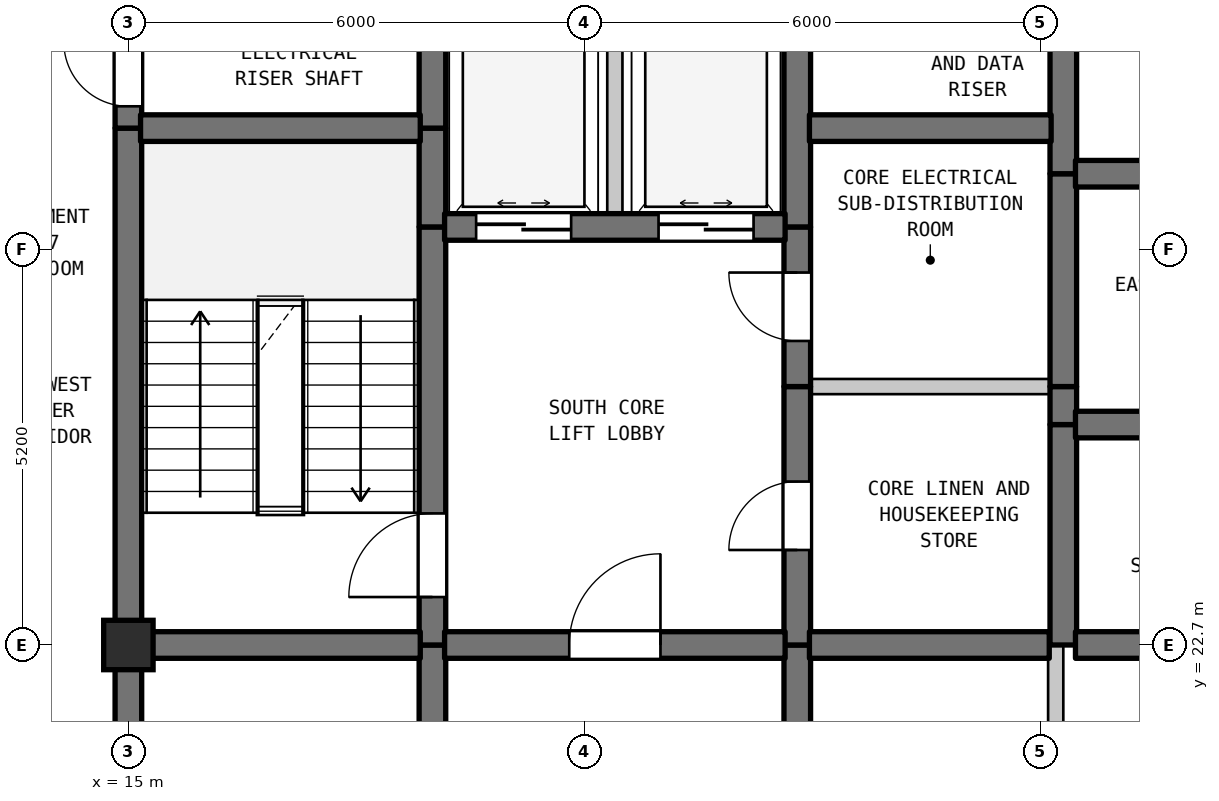
"""IFC4 building model, lengths in metres.
Left out: names, types, materials, properties, quantities, classifications, styles, units other than length and angle.
Written with IfcOpenShell. Run it as: python <this file> out.ifc"""

import sys

from ifc_helpers import new_model, si_unit, direction, frame, frame_2d, origin, origin_2d, place, context, subcontext, project, spatial, rectangle, extrude, element, fill, save


model = new_model("IFC4")
c1 = context("Model", 3, precision=1e-05, world=origin(), true_north=direction((0.0, 1.0)))
c2 = subcontext(c1, "Body", "Model", "MODEL_VIEW")
j1 = project(units=[si_unit("LENGTHUNIT", "METRE"), si_unit("PLANEANGLEUNIT", "RADIAN")], contexts=[c1])
p1 = place(None, origin())
s1 = spatial("IfcSite", under=j1, at=p1, CompositionType="ELEMENT")
p2 = place(p1, origin())
s2 = spatial("IfcBuilding", under=s1, at=p2, CompositionType="ELEMENT")
p3 = place(p2, frame((0.0, 0.0, 288.0)))
s3 = spatial("IfcBuildingStorey", under=s2, at=p3, CompositionType="ELEMENT", Elevation=288.0)
p4 = place(p3, frame((15.0, 22.7, 0.0), z_axis=(0.0, 0.0, 1.0), x_axis=(1.0, 0.0, 0.0)))
e1 = element("IfcColumn", 1, at=p4, inside=s3, PredefinedType="COLUMN", context=c2, shape_type="SweptSolid", body=[
    extrude(rectangle(XDim=0.65, YDim=0.65, at=origin_2d()), origin(), (0.0, 0.0, 1.0), 3.7),
])
p5 = place(p3, frame((15.0, 19.5, 0.0), z_axis=(0.0, 0.0, 1.0), x_axis=(0.0, 1.0, 0.0)))
e2 = element("IfcWall", 2, at=p5, inside=s3, PredefinedType="SHEAR", context=c2, shape_type="SweptSolid", body=[
    extrude(rectangle(XDim=3.2, YDim=0.35, at=frame_2d((1.6, 0.0))), origin(), (0.0, 0.0, 1.0), 3.39),
])
p6 = place(p3, frame((15.0, 22.7, 0.0), z_axis=(0.0, 0.0, 1.0), x_axis=(0.0, 1.0, 0.0)))
e3 = element("IfcWall", 3, at=p6, inside=s3, PredefinedType="SHEAR", context=c2, shape_type="SweptSolid", body=[
    extrude(rectangle(XDim=6.8, YDim=0.35, at=frame_2d((3.4, 0.0))), origin(), (0.0, 0.0, 1.0), 3.39),
])
p7 = place(p3, frame((15.0, 29.5, 0.0), z_axis=(0.0, 0.0, 1.0), x_axis=(0.0, 1.0, 0.0)))
e4 = element("IfcWall", 4, at=p7, inside=s3, PredefinedType="SHEAR", context=c2, shape_type="SweptSolid", body=[
    extrude(rectangle(XDim=1.6, YDim=0.35, at=frame_2d((0.8, 0.0))), origin(), (0.0, 0.0, 1.0), 3.39),
])
p8 = place(p7, frame((0.287, 0.0, 0.0)))
e5 = element("IfcOpeningElement", 5, at=p8, cuts=e4, PredefinedType="OPENING", context=c2, shape_type="SweptSolid", body=[
    extrude(rectangle(XDim=0.85, YDim=2.1, at=frame_2d((0.425, 1.05))), frame((0.0, 0.185, 0.0), z_axis=(0.0, -1.0, 0.0), x_axis=(1.0, 0.0, 0.0)), (0.0, 0.0, 1.0), 0.37),
])
p9 = place(p3, frame((19.0, 19.5, 0.0), z_axis=(0.0, 0.0, 1.0), x_axis=(0.0, 1.0, 0.0)))
e6 = element("IfcWall", 6, at=p9, inside=s3, PredefinedType="SHEAR", context=c2, shape_type="SweptSolid", body=[
    extrude(rectangle(XDim=3.2, YDim=0.35, at=frame_2d((1.6, 0.0))), origin(), (0.0, 0.0, 1.0), 3.39),
])
p10 = place(p3, frame((19.0, 22.7, 0.0), z_axis=(0.0, 0.0, 1.0), x_axis=(0.0, 1.0, 0.0)))
e7 = element("IfcWall", 7, at=p10, inside=s3, PredefinedType="SHEAR", context=c2, shape_type="SweptSolid", body=[
    extrude(rectangle(XDim=5.5, YDim=0.35, at=frame_2d((2.75, 0.0))), origin(), (0.0, 0.0, 1.0), 3.39),
])
p11 = place(p10, frame((0.631, 0.0, 0.0)))
e8 = element("IfcOpeningElement", 8, at=p11, cuts=e7, PredefinedType="OPENING", context=c2, shape_type="SweptSolid", body=[
    extrude(rectangle(XDim=1.1, YDim=2.15, at=frame_2d((0.55, 1.075))), frame((0.0, 0.185, 0.0), z_axis=(0.0, -1.0, 0.0), x_axis=(1.0, 0.0, 0.0)), (0.0, 0.0, 1.0), 0.37),
])
p12 = place(p3, frame((19.0, 28.2, 0.0), z_axis=(0.0, 0.0, 1.0), x_axis=(0.0, 1.0, 0.0)))
e9 = element("IfcWall", 9, at=p12, inside=s3, PredefinedType="SHEAR", context=c2, shape_type="SweptSolid", body=[
    extrude(rectangle(XDim=1.3, YDim=0.35, at=frame_2d((0.65, 0.0))), origin(), (0.0, 0.0, 1.0), 3.39),
])
p13 = place(p3, frame((19.0, 29.5, 0.0), z_axis=(0.0, 0.0, 1.0), x_axis=(0.0, 1.0, 0.0)))
e10 = element("IfcWall", 10, at=p13, inside=s3, PredefinedType="SHEAR", context=c2, shape_type="SweptSolid", body=[
    extrude(rectangle(XDim=5.5, YDim=0.35, at=frame_2d((2.75, 0.0))), origin(), (0.0, 0.0, 1.0), 3.39),
])
p14 = place(p13, frame((2.025, 0.0, 0.0)))
e11 = element("IfcOpeningElement", 11, at=p14, cuts=e10, PredefinedType="OPENING", context=c2, shape_type="SweptSolid", body=[
    extrude(rectangle(XDim=1.1, YDim=2.15, at=frame_2d((0.55, 1.075))), frame((0.0, 0.185, 0.0), z_axis=(0.0, -1.0, 0.0), x_axis=(1.0, 0.0, 0.0)), (0.0, 0.0, 1.0), 0.37),
])
p15 = place(p3, frame((21.4, 28.2, 0.0), z_axis=(0.0, 0.0, 1.0), x_axis=(0.0, 1.0, 0.0)))
e12 = element("IfcWall", 12, at=p15, inside=s3, PredefinedType="STANDARD", context=c2, shape_type="SweptSolid", body=[
    extrude(rectangle(XDim=2.6, YDim=0.2, at=frame_2d((1.3, 0.0))), origin(), (0.0, 0.0, 1.0), 3.39),
])
p16 = place(p3, frame((23.8, 19.5, 0.0), z_axis=(0.0, 0.0, 1.0), x_axis=(0.0, 1.0, 0.0)))
e13 = element("IfcWall", 13, at=p16, inside=s3, PredefinedType="SHEAR", context=c2, shape_type="SweptSolid", body=[
    extrude(rectangle(XDim=3.2, YDim=0.35, at=frame_2d((1.6, 0.0))), origin(), (0.0, 0.0, 1.0), 3.39),
])
p17 = place(p3, frame((23.8, 22.7, 0.0), z_axis=(0.0, 0.0, 1.0), x_axis=(0.0, 1.0, 0.0)))
e14 = element("IfcWall", 14, at=p17, inside=s3, PredefinedType="SHEAR", context=c2, shape_type="SweptSolid", body=[
    extrude(rectangle(XDim=3.4, YDim=0.35, at=frame_2d((1.7, 0.0))), origin(), (0.0, 0.0, 1.0), 3.39),
])
p18 = place(p17, frame((1.25, 0.0, 0.0)))
e15 = element("IfcOpeningElement", 15, at=p18, cuts=e14, PredefinedType="OPENING", context=c2, shape_type="SweptSolid", body=[
    extrude(rectangle(XDim=0.9, YDim=2.15, at=frame_2d((0.45, 1.075))), frame((0.0, 0.185, 0.0), z_axis=(0.0, -1.0, 0.0), x_axis=(1.0, 0.0, 0.0)), (0.0, 0.0, 1.0), 0.37),
])
p19 = place(p3, frame((23.8, 26.1, 0.0), z_axis=(0.0, 0.0, 1.0), x_axis=(0.0, 1.0, 0.0)))
e16 = element("IfcWall", 16, at=p19, inside=s3, PredefinedType="SHEAR", context=c2, shape_type="SweptSolid", body=[
    extrude(rectangle(XDim=2.1, YDim=0.35, at=frame_2d((1.05, 0.0))), origin(), (0.0, 0.0, 1.0), 3.39),
])
p20 = place(p19, frame((0.6, 0.0, 0.0)))
e17 = element("IfcOpeningElement", 17, at=p20, cuts=e16, PredefinedType="OPENING", context=c2, shape_type="SweptSolid", body=[
    extrude(rectangle(XDim=0.9, YDim=2.15, at=frame_2d((0.45, 1.075))), frame((0.0, 0.185, 0.0), z_axis=(0.0, -1.0, 0.0), x_axis=(1.0, 0.0, 0.0)), (0.0, 0.0, 1.0), 0.37),
])
p21 = place(p3, frame((23.8, 28.2, 0.0), z_axis=(0.0, 0.0, 1.0), x_axis=(0.0, 1.0, 0.0)))
e18 = element("IfcWall", 18, at=p21, inside=s3, PredefinedType="SHEAR", context=c2, shape_type="SweptSolid", body=[
    extrude(rectangle(XDim=2.6, YDim=0.35, at=frame_2d((1.3, 0.0))), origin(), (0.0, 0.0, 1.0), 3.39),
])
p22 = place(p3, frame((27.2, 21.1, 0.0), z_axis=(0.0, 0.0, 1.0), x_axis=(0.0, 1.0, 0.0)))
e19 = element("IfcWall", 19, at=p22, inside=s3, PredefinedType="STANDARD", context=c2, shape_type="SweptSolid", body=[
    extrude(rectangle(XDim=1.6, YDim=0.2, at=frame_2d((0.8, 0.0))), origin(), (0.0, 0.0, 1.0), 3.39),
])
p23 = place(p3, frame((27.3, 22.7, 0.0), z_axis=(0.0, 0.0, 1.0), x_axis=(0.0, 1.0, 0.0)))
e20 = element("IfcWall", 20, at=p23, inside=s3, PredefinedType="SHEAR", context=c2, shape_type="SweptSolid", body=[
    extrude(rectangle(XDim=2.9, YDim=0.35, at=frame_2d((1.45, 0.0))), origin(), (0.0, 0.0, 1.0), 3.39),
])
p24 = place(p3, frame((27.3, 25.6, 0.0), z_axis=(0.0, 0.0, 1.0), x_axis=(0.0, 1.0, 0.0)))
e21 = element("IfcWall", 21, at=p24, inside=s3, PredefinedType="SHEAR", context=c2, shape_type="SweptSolid", body=[
    extrude(rectangle(XDim=0.5, YDim=0.35, at=frame_2d((0.25, 0.0))), origin(), (0.0, 0.0, 1.0), 3.39),
])
p25 = place(p3, frame((27.3, 26.1, 0.0), z_axis=(0.0, 0.0, 1.0), x_axis=(0.0, 1.0, 0.0)))
e22 = element("IfcWall", 22, at=p25, inside=s3, PredefinedType="SHEAR", context=c2, shape_type="SweptSolid", body=[
    extrude(rectangle(XDim=2.8, YDim=0.35, at=frame_2d((1.4, 0.0))), origin(), (0.0, 0.0, 1.0), 3.39),
])
p26 = place(p3, frame((27.3, 28.9, 0.0), z_axis=(0.0, 0.0, 1.0), x_axis=(0.0, 1.0, 0.0)))
e23 = element("IfcWall", 23, at=p26, inside=s3, PredefinedType="SHEAR", context=c2, shape_type="SweptSolid", body=[
    extrude(rectangle(XDim=2.6, YDim=0.35, at=frame_2d((1.3, 0.0))), origin(), (0.0, 0.0, 1.0), 3.39),
])
p27 = place(p3, frame((15.16, 22.7, 0.0), z_axis=(0.0, 0.0, 1.0), x_axis=(1.0, 0.0, 0.0)))
e24 = element("IfcWall", 24, at=p27, inside=s3, PredefinedType="SHEAR", context=c2, shape_type="SweptSolid", body=[
    extrude(rectangle(XDim=3.68, YDim=0.35, at=frame_2d((1.84, 0.0))), origin(), (0.0, 0.0, 1.0), 3.39),
])
p28 = place(p3, frame((19.16, 22.7, 0.0), z_axis=(0.0, 0.0, 1.0), x_axis=(1.0, 0.0, 0.0)))
e25 = element("IfcWall", 25, at=p28, inside=s3, PredefinedType="SHEAR", context=c2, shape_type="SweptSolid", body=[
    extrude(rectangle(XDim=4.48, YDim=0.35, at=frame_2d((2.24, 0.0))), origin(), (0.0, 0.0, 1.0), 3.39),
])
p29 = place(p28, frame((1.64, 0.0, 0.0)))
e26 = element("IfcOpeningElement", 26, at=p29, cuts=e25, PredefinedType="OPENING", context=c2, shape_type="SweptSolid", body=[
    extrude(rectangle(XDim=1.2, YDim=2.2, at=frame_2d((0.6, 1.1))), frame((0.0, 0.185, 0.0), z_axis=(0.0, -1.0, 0.0), x_axis=(1.0, 0.0, 0.0)), (0.0, 0.0, 1.0), 0.37),
])
p30 = place(p3, frame((23.96, 22.7, 0.0), z_axis=(0.0, 0.0, 1.0), x_axis=(1.0, 0.0, 0.0)))
e27 = element("IfcWall", 27, at=p30, inside=s3, PredefinedType="SHEAR", context=c2, shape_type="SweptSolid", body=[
    extrude(rectangle(XDim=3.155, YDim=0.35, at=frame_2d((1.578, 0.0))), origin(), (0.0, 0.0, 1.0), 3.39),
])
p31 = place(p3, frame((27.46, 22.7, 0.0), z_axis=(0.0, 0.0, 1.0), x_axis=(1.0, 0.0, 0.0)))
e28 = element("IfcWall", 28, at=p31, inside=s3, PredefinedType="SHEAR", context=c2, shape_type="SweptSolid", body=[
    extrude(rectangle(XDim=3.18, YDim=0.35, at=frame_2d((1.59, 0.0))), origin(), (0.0, 0.0, 1.0), 3.39),
])
p32 = place(p3, frame((27.46, 25.6, 0.0), z_axis=(0.0, 0.0, 1.0), x_axis=(1.0, 0.0, 0.0)))
e29 = element("IfcWall", 29, at=p32, inside=s3, PredefinedType="SHEAR", context=c2, shape_type="SweptSolid", body=[
    extrude(rectangle(XDim=3.18, YDim=0.35, at=frame_2d((1.59, 0.0))), origin(), (0.0, 0.0, 1.0), 3.39),
])
p33 = place(p32, frame((1.115, 0.0, 0.0)))
e30 = element("IfcOpeningElement", 30, at=p33, cuts=e29, PredefinedType="OPENING", context=c2, shape_type="SweptSolid", body=[
    extrude(rectangle(XDim=0.95, YDim=2.15, at=frame_2d((0.475, 1.075))), frame((0.0, 0.185, 0.0), z_axis=(0.0, -1.0, 0.0), x_axis=(1.0, 0.0, 0.0)), (0.0, 0.0, 1.0), 0.37),
])
p34 = place(p3, frame((23.96, 26.1, 0.0), z_axis=(0.0, 0.0, 1.0), x_axis=(1.0, 0.0, 0.0)))
e31 = element("IfcWall", 31, at=p34, inside=s3, PredefinedType="STANDARD", context=c2, shape_type="SweptSolid", body=[
    extrude(rectangle(XDim=3.18, YDim=0.2, at=frame_2d((1.59, 0.0))), origin(), (0.0, 0.0, 1.0), 3.39),
])
p35 = place(p3, frame((19.16, 28.2, 0.0), z_axis=(0.0, 0.0, 1.0), x_axis=(1.0, 0.0, 0.0)))
e32 = element("IfcWall", 32, at=p35, inside=s3, PredefinedType="SHEAR", context=c2, shape_type="SweptSolid", body=[
    extrude(rectangle(XDim=4.48, YDim=0.35, at=frame_2d((2.24, 0.0))), origin(), (0.0, 0.0, 1.0), 3.39),
])
p36 = place(p35, frame((0.415, 0.0, 0.0)))
e33 = element("IfcOpeningElement", 33, at=p36, cuts=e32, PredefinedType="OPENING", context=c2, shape_type="SweptSolid", body=[
    extrude(rectangle(XDim=1.25, YDim=2.2, at=frame_2d((0.625, 1.1))), frame((0.0, 0.185, 0.0), z_axis=(0.0, -1.0, 0.0), x_axis=(1.0, 0.0, 0.0)), (0.0, 0.0, 1.0), 0.37),
])
p37 = place(p35, frame((2.815, 0.0, 0.0)))
e34 = element("IfcOpeningElement", 34, at=p37, cuts=e32, PredefinedType="OPENING", context=c2, shape_type="SweptSolid", body=[
    extrude(rectangle(XDim=1.25, YDim=2.2, at=frame_2d((0.625, 1.1))), frame((0.0, 0.185, 0.0), z_axis=(0.0, -1.0, 0.0), x_axis=(1.0, 0.0, 0.0)), (0.0, 0.0, 1.0), 0.37),
])
p38 = place(p3, frame((27.46, 28.9, 0.0), z_axis=(0.0, 0.0, 1.0), x_axis=(1.0, 0.0, 0.0)))
e35 = element("IfcWall", 35, at=p38, inside=s3, PredefinedType="SHEAR", context=c2, shape_type="SweptSolid", body=[
    extrude(rectangle(XDim=3.18, YDim=0.35, at=frame_2d((1.59, 0.0))), origin(), (0.0, 0.0, 1.0), 3.39),
])
p39 = place(p38, frame((1.115, 0.0, 0.0)))
e36 = element("IfcOpeningElement", 36, at=p39, cuts=e35, PredefinedType="OPENING", context=c2, shape_type="SweptSolid", body=[
    extrude(rectangle(XDim=0.95, YDim=2.15, at=frame_2d((0.475, 1.075))), frame((0.0, 0.185, 0.0), z_axis=(0.0, -1.0, 0.0), x_axis=(1.0, 0.0, 0.0)), (0.0, 0.0, 1.0), 0.37),
])
p40 = place(p3, frame((15.16, 29.5, 0.0), z_axis=(0.0, 0.0, 1.0), x_axis=(1.0, 0.0, 0.0)))
e37 = element("IfcWall", 37, at=p40, inside=s3, PredefinedType="SHEAR", context=c2, shape_type="SweptSolid", body=[
    extrude(rectangle(XDim=3.68, YDim=0.35, at=frame_2d((1.84, 0.0))), origin(), (0.0, 0.0, 1.0), 3.39),
])
p41 = place(p3, frame((23.96, 29.5, 0.0), z_axis=(0.0, 0.0, 1.0), x_axis=(1.0, 0.0, 0.0)))
e38 = element("IfcWall", 38, at=p41, inside=s3, PredefinedType="SHEAR", context=c2, shape_type="SweptSolid", body=[
    extrude(rectangle(XDim=3.18, YDim=0.35, at=frame_2d((1.59, 0.0))), origin(), (0.0, 0.0, 1.0), 3.39),
])
p42 = place(p8, origin())
e39 = element("IfcDoor", 39, at=p42, inside=s3, OperationType="SINGLE_SWING_RIGHT", PredefinedType="DOOR", context=c2, shape_type="SweptSolid", body=[
    extrude(rectangle(XDim=0.85, YDim=2.1, at=frame_2d((0.425, 1.05))), frame((0.0, 0.025, 0.0), z_axis=(0.0, -1.0, 0.0), x_axis=(1.0, 0.0, 0.0)), (0.0, 0.0, 1.0), 0.05),
])
fill(e5, e39)
p43 = place(p11, origin())
e40 = element("IfcDoor", 40, at=p43, inside=s3, OperationType="SINGLE_SWING_LEFT", PredefinedType="DOOR", context=c2, shape_type="SweptSolid", body=[
    extrude(rectangle(XDim=1.1, YDim=2.15, at=frame_2d((0.55, 1.075))), frame((0.0, 0.025, 0.0), z_axis=(0.0, -1.0, 0.0), x_axis=(1.0, 0.0, 0.0)), (0.0, 0.0, 1.0), 0.05),
])
fill(e8, e40)
p44 = place(p18, origin())
e41 = element("IfcDoor", 41, at=p44, inside=s3, OperationType="SINGLE_SWING_LEFT", PredefinedType="DOOR", context=c2, shape_type="SweptSolid", body=[
    extrude(rectangle(XDim=0.9, YDim=2.15, at=frame_2d((0.45, 1.075))), frame((0.0, 0.025, 0.0), z_axis=(0.0, -1.0, 0.0), x_axis=(1.0, 0.0, 0.0)), (0.0, 0.0, 1.0), 0.05),
])
fill(e15, e41)
p45 = place(p20, origin())
e42 = element("IfcDoor", 42, at=p45, inside=s3, OperationType="SINGLE_SWING_RIGHT", PredefinedType="DOOR", context=c2, shape_type="SweptSolid", body=[
    extrude(rectangle(XDim=0.9, YDim=2.15, at=frame_2d((0.45, 1.075))), frame((0.0, 0.025, 0.0), z_axis=(0.0, -1.0, 0.0), x_axis=(1.0, 0.0, 0.0)), (0.0, 0.0, 1.0), 0.05),
])
fill(e17, e42)
p46 = place(p29, origin())
e43 = element("IfcDoor", 43, at=p46, inside=s3, OperationType="SINGLE_SWING_RIGHT", PredefinedType="DOOR", context=c2, shape_type="SweptSolid", body=[
    extrude(rectangle(XDim=1.2, YDim=2.2, at=frame_2d((0.6, 1.1))), frame((0.0, 0.025, 0.0), z_axis=(0.0, -1.0, 0.0), x_axis=(1.0, 0.0, 0.0)), (0.0, 0.0, 1.0), 0.05),
])
fill(e26, e43)
p47 = place(p36, origin())
e44 = element("IfcDoor", 44, at=p47, inside=s3, OperationType="DOUBLE_DOOR_SLIDING", PredefinedType="DOOR", context=c2, shape_type="SweptSolid", body=[
    extrude(rectangle(XDim=1.25, YDim=2.2, at=frame_2d((0.625, 1.1))), frame((0.0, 0.025, 0.0), z_axis=(0.0, -1.0, 0.0), x_axis=(1.0, 0.0, 0.0)), (0.0, 0.0, 1.0), 0.05),
])
fill(e33, e44)
p48 = place(p37, origin())
e45 = element("IfcDoor", 45, at=p48, inside=s3, OperationType="DOUBLE_DOOR_SLIDING", PredefinedType="DOOR", context=c2, shape_type="SweptSolid", body=[
    extrude(rectangle(XDim=1.25, YDim=2.2, at=frame_2d((0.625, 1.1))), frame((0.0, 0.025, 0.0), z_axis=(0.0, -1.0, 0.0), x_axis=(1.0, 0.0, 0.0)), (0.0, 0.0, 1.0), 0.05),
])
fill(e34, e45)
save(model, sys.argv[1])
